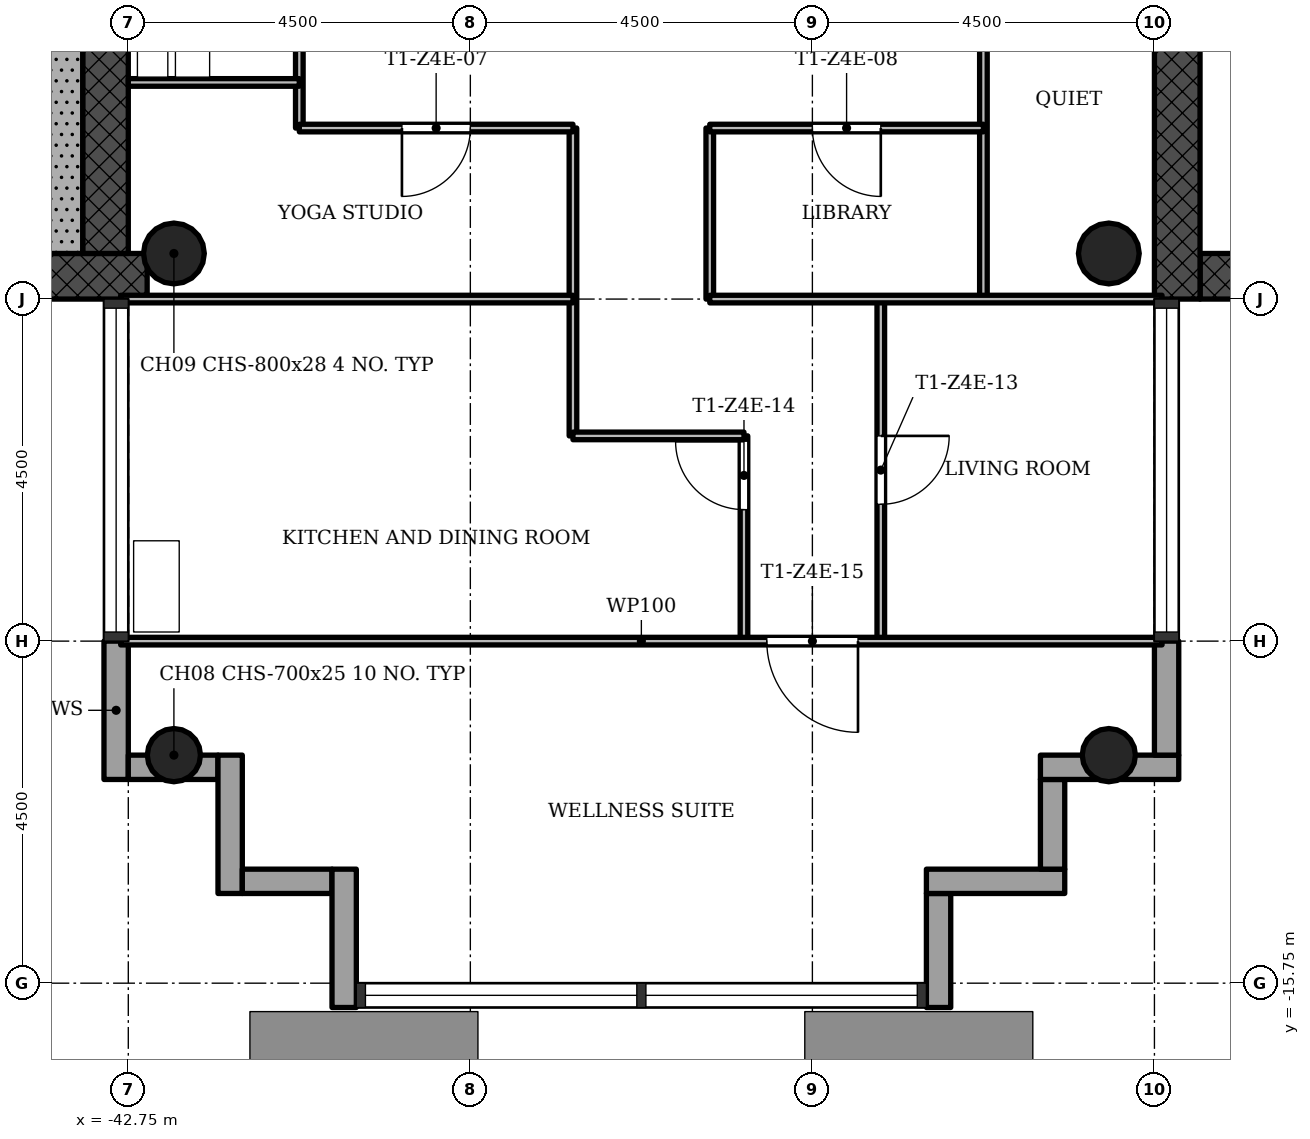
"""IFC4 building model, lengths in metres.
Left out: names, types, materials, properties, quantities, classifications, styles, units other than length and angle.
Written with IfcOpenShell. Run it as: python <this file> out.ifc"""

import sys

from ifc_helpers import new_model, si_unit, direction, frame, frame_2d, origin, origin_2d, place, context, subcontext, project, spatial, rectangle, hollow_circle, extrude, element, fill, save


model = new_model("IFC4")
c1 = context("Model", 3, precision=1e-05, world=origin(), true_north=direction((0.0, 1.0)))
c2 = subcontext(c1, "Body", "Model", "MODEL_VIEW")
j1 = project(units=[si_unit("LENGTHUNIT", "METRE"), si_unit("PLANEANGLEUNIT", "RADIAN")], contexts=[c1])
p1 = place(None, origin())
s1 = spatial("IfcSite", under=j1, at=p1, CompositionType="ELEMENT")
p2 = place(p1, origin())
s2 = spatial("IfcBuilding", under=s1, at=p2, CompositionType="ELEMENT")
p3 = place(p2, frame((0.0, 0.0, 209.6)))
s3 = spatial("IfcBuildingStorey", under=s2, at=p3, CompositionType="ELEMENT", Elevation=209.6)
p4 = place(p3, frame((-28.65, -6.45, 0.0), z_axis=(0.0, 0.0, 1.0), x_axis=(1.0, 0.0, 0.0)))
e1 = element("IfcWall", 1, at=p4, inside=s3, PredefinedType="SHEAR", context=c2, shape_type="SweptSolid", body=[
    extrude(rectangle(XDim=8.4, YDim=0.6, at=frame_2d((4.2, 0.0))), origin(), (0.0, 0.0, 1.0), 3.4),
])
p5 = place(p3, frame((-28.95, 6.15, 0.0), z_axis=(0.0, 0.0, 1.0), x_axis=(0.0, -1.0, 0.0)))
e2 = element("IfcWall", 2, at=p5, inside=s3, PredefinedType="SHEAR", context=c2, shape_type="SweptSolid", body=[
    extrude(rectangle(XDim=12.9, YDim=0.6, at=frame_2d((6.45, 0.0))), origin(), (0.0, 0.0, 1.0), 3.4),
])
p6 = place(p5, frame((5.25, 0.0, 0.0)))
e3 = element("IfcOpeningElement", 3, at=p6, cuts=e2, PredefinedType="OPENING", context=c2, shape_type="SweptSolid", body=[
    extrude(rectangle(XDim=1.8, YDim=2.1, at=frame_2d((0.9, 1.05))), frame((0.0, 0.31, 0.0), z_axis=(0.0, -1.0, 0.0), x_axis=(1.0, 0.0, 0.0)), (0.0, 0.0, 1.0), 0.62),
])
p7 = place(p3, frame((-51.15, -6.45, 0.0), z_axis=(0.0, 0.0, 1.0), x_axis=(1.0, 0.0, 0.0)))
e4 = element("IfcWall", 4, at=p7, inside=s3, PredefinedType="SHEAR", context=c2, shape_type="SweptSolid", body=[
    extrude(rectangle(XDim=8.648, YDim=0.6, at=frame_2d((4.324, 0.0))), origin(), (0.0, 0.0, 1.0), 3.4),
])
p8 = place(p3, frame((-43.05, -6.15, 0.0), z_axis=(0.0, 0.0, 1.0), x_axis=(0.0, 1.0, 0.0)))
e5 = element("IfcWall", 5, at=p8, inside=s3, PredefinedType="SHEAR", context=c2, shape_type="SweptSolid", body=[
    extrude(rectangle(XDim=12.9, YDim=0.6, at=frame_2d((6.45, 0.0))), origin(), (0.0, 0.0, 1.0), 3.4),
])
p9 = place(p8, frame((5.25, 0.0, 0.0)))
e6 = element("IfcOpeningElement", 6, at=p9, cuts=e5, PredefinedType="OPENING", context=c2, shape_type="SweptSolid", body=[
    extrude(rectangle(XDim=1.8, YDim=2.1, at=frame_2d((0.9, 1.05))), frame((0.0, 0.31, 0.0), z_axis=(0.0, -1.0, 0.0), x_axis=(1.0, 0.0, 0.0)), (0.0, 0.0, 1.0), 0.62),
])
for number, where, z_axis, x_axis in (
    (7, (-42.15, -12.75, 0.0), (0.0, 0.0, 1.0), (1.0, 0.0, 0.0)),
    (8, (-29.85, -12.75, 0.0), (0.0, 0.0, 1.0), (1.0, 0.0, 0.0)),
):
    element("IfcColumn", number, at=place(p3, frame(where, z_axis=z_axis, x_axis=x_axis)), inside=s3, PredefinedType="COLUMN", context=c2, shape_type="SweptSolid", body=[
        extrude(hollow_circle(Radius=0.35, WallThickness=0.025, at=origin_2d()), origin(), (0.0, 0.0, 1.0), 3.4),
    ])
for number, where, z_axis, x_axis in (
    (9, (-42.15, -6.15, 0.0), (0.0, 0.0, 1.0), (1.0, 0.0, 0.0)),
    (10, (-29.85, -6.15, 0.0), (0.0, 0.0, 1.0), (1.0, 0.0, 0.0)),
):
    element("IfcColumn", number, at=place(p3, frame(where, z_axis=z_axis, x_axis=x_axis)), inside=s3, PredefinedType="COLUMN", context=c2, shape_type="SweptSolid", body=[
        extrude(hollow_circle(Radius=0.4, WallThickness=0.028, at=origin_2d()), origin(), (0.0, 0.0, 1.0), 3.4),
    ])
p10 = place(p3, frame((-42.91, -11.25, -0.3), z_axis=(0.0, 0.0, 1.0), x_axis=(0.0, -1.0, 0.0)))
e11 = element("IfcWall", 11, at=p10, inside=s3, PredefinedType="STANDARD", context=c2, shape_type="SweptSolid", body=[
    extrude(rectangle(XDim=1.82, YDim=0.32, at=frame_2d((0.91, 0.0))), origin(), (0.0, 0.0, 1.0), 3.4),
])
p11 = place(p3, frame((-42.75, -12.91, -0.3), z_axis=(0.0, 0.0, 1.0), x_axis=(1.0, 0.0, 0.0)))
e12 = element("IfcWall", 12, at=p11, inside=s3, PredefinedType="STANDARD", context=c2, shape_type="SweptSolid", body=[
    extrude(rectangle(XDim=1.18, YDim=0.32, at=frame_2d((0.59, 0.0))), origin(), (0.0, 0.0, 1.0), 3.4),
])
p12 = place(p3, frame((-41.41, -12.75, -0.3), z_axis=(0.0, 0.0, 1.0), x_axis=(0.0, -1.0, 0.0)))
e13 = element("IfcWall", 13, at=p12, inside=s3, PredefinedType="STANDARD", context=c2, shape_type="SweptSolid", body=[
    extrude(rectangle(XDim=1.82, YDim=0.32, at=frame_2d((0.91, 0.0))), origin(), (0.0, 0.0, 1.0), 3.4),
])
p13 = place(p3, frame((-41.25, -14.41, -0.3), z_axis=(0.0, 0.0, 1.0), x_axis=(1.0, 0.0, 0.0)))
e14 = element("IfcWall", 14, at=p13, inside=s3, PredefinedType="STANDARD", context=c2, shape_type="SweptSolid", body=[
    extrude(rectangle(XDim=1.18, YDim=0.32, at=frame_2d((0.59, 0.0))), origin(), (0.0, 0.0, 1.0), 3.4),
])
p14 = place(p3, frame((-39.91, -14.25, -0.3), z_axis=(0.0, 0.0, 1.0), x_axis=(0.0, -1.0, 0.0)))
e15 = element("IfcWall", 15, at=p14, inside=s3, PredefinedType="STANDARD", context=c2, shape_type="SweptSolid", body=[
    extrude(rectangle(XDim=1.82, YDim=0.32, at=frame_2d((0.91, 0.0))), origin(), (0.0, 0.0, 1.0), 3.4),
])
p15 = place(p3, frame((-32.09, -16.07, -0.3), z_axis=(0.0, 0.0, 1.0), x_axis=(0.0, 1.0, 0.0)))
e16 = element("IfcWall", 16, at=p15, inside=s3, PredefinedType="STANDARD", context=c2, shape_type="SweptSolid", body=[
    extrude(rectangle(XDim=1.5, YDim=0.32, at=frame_2d((0.75, 0.0))), origin(), (0.0, 0.0, 1.0), 3.4),
])
p16 = place(p3, frame((-32.25, -14.41, -0.3), z_axis=(0.0, 0.0, 1.0), x_axis=(1.0, 0.0, 0.0)))
e17 = element("IfcWall", 17, at=p16, inside=s3, PredefinedType="STANDARD", context=c2, shape_type="SweptSolid", body=[
    extrude(rectangle(XDim=1.82, YDim=0.32, at=frame_2d((0.91, 0.0))), origin(), (0.0, 0.0, 1.0), 3.4),
])
p17 = place(p3, frame((-30.59, -14.25, -0.3), z_axis=(0.0, 0.0, 1.0), x_axis=(0.0, 1.0, 0.0)))
e18 = element("IfcWall", 18, at=p17, inside=s3, PredefinedType="STANDARD", context=c2, shape_type="SweptSolid", body=[
    extrude(rectangle(XDim=1.18, YDim=0.32, at=frame_2d((0.59, 0.0))), origin(), (0.0, 0.0, 1.0), 3.4),
])
p18 = place(p3, frame((-30.75, -12.91, -0.3), z_axis=(0.0, 0.0, 1.0), x_axis=(1.0, 0.0, 0.0)))
e19 = element("IfcWall", 19, at=p18, inside=s3, PredefinedType="STANDARD", context=c2, shape_type="SweptSolid", body=[
    extrude(rectangle(XDim=1.82, YDim=0.32, at=frame_2d((0.91, 0.0))), origin(), (0.0, 0.0, 1.0), 3.4),
])
p19 = place(p3, frame((-29.09, -12.75, -0.3), z_axis=(0.0, 0.0, 1.0), x_axis=(0.0, 1.0, 0.0)))
e20 = element("IfcWall", 20, at=p19, inside=s3, PredefinedType="STANDARD", context=c2, shape_type="SweptSolid", body=[
    extrude(rectangle(XDim=1.5, YDim=0.32, at=frame_2d((0.75, 0.0))), origin(), (0.0, 0.0, 1.0), 3.4),
])
p20 = place(p3, frame((-40.5, -4.5, 0.0), z_axis=(0.0, 0.0, 1.0), x_axis=(0.0, 1.0, 0.0)))
e21 = element("IfcWall", 21, at=p20, inside=s3, PredefinedType="PARTITIONING", context=c2, shape_type="SweptSolid", body=[
    extrude(rectangle(XDim=3.0, YDim=0.1, at=frame_2d((1.5, 0.0))), origin(), (0.0, 0.0, 1.0), 3.0),
])
p21 = place(p3, frame((-36.9, -8.55, 0.0), z_axis=(0.0, 0.0, 1.0), x_axis=(0.0, 1.0, 0.0)))
e22 = element("IfcWall", 22, at=p21, inside=s3, PredefinedType="PARTITIONING", context=c2, shape_type="SweptSolid", body=[
    extrude(rectangle(XDim=4.05, YDim=0.1, at=frame_2d((2.025, 0.0))), origin(), (0.0, 0.0, 1.0), 3.0),
])
p22 = place(p3, frame((-35.1, -6.75, 0.0), z_axis=(0.0, 0.0, 1.0), x_axis=(0.0, 1.0, 0.0)))
e23 = element("IfcWall", 23, at=p22, inside=s3, PredefinedType="PARTITIONING", context=c2, shape_type="SweptSolid", body=[
    extrude(rectangle(XDim=2.25, YDim=0.1, at=frame_2d((1.125, 0.0))), origin(), (0.0, 0.0, 1.0), 3.0),
])
p23 = place(p3, frame((-34.65, -11.25, 0.0), z_axis=(0.0, 0.0, 1.0), x_axis=(0.0, 1.0, 0.0)))
e24 = element("IfcWall", 24, at=p23, inside=s3, PredefinedType="PARTITIONING", context=c2, shape_type="SweptSolid", body=[
    extrude(rectangle(XDim=2.7, YDim=0.1, at=frame_2d((1.35, 0.0))), origin(), (0.0, 0.0, 1.0), 3.0),
])
p24 = place(p23, frame((1.73, 0.0, 0.0)))
e25 = element("IfcOpeningElement", 25, at=p24, cuts=e24, PredefinedType="OPENING", context=c2, shape_type="SweptSolid", body=[
    extrude(rectangle(XDim=0.9, YDim=2.1, at=frame_2d((0.45, 1.05))), frame((0.0, 0.06, 0.0), z_axis=(0.0, -1.0, 0.0), x_axis=(1.0, 0.0, 0.0)), (0.0, 0.0, 1.0), 0.12),
])
p25 = place(p3, frame((-32.85, -11.25, 0.0), z_axis=(0.0, 0.0, 1.0), x_axis=(0.0, 1.0, 0.0)))
e26 = element("IfcWall", 26, at=p25, inside=s3, PredefinedType="PARTITIONING", context=c2, shape_type="SweptSolid", body=[
    extrude(rectangle(XDim=4.5, YDim=0.1, at=frame_2d((2.25, 0.0))), origin(), (0.0, 0.0, 1.0), 3.0),
])
p26 = place(p25, frame((1.8, 0.0, 0.0)))
e27 = element("IfcOpeningElement", 27, at=p26, cuts=e26, PredefinedType="OPENING", context=c2, shape_type="SweptSolid", body=[
    extrude(rectangle(XDim=0.9, YDim=2.1, at=frame_2d((0.45, 1.05))), frame((0.0, 0.06, 0.0), z_axis=(0.0, -1.0, 0.0), x_axis=(1.0, 0.0, 0.0)), (0.0, 0.0, 1.0), 0.12),
])
p27 = place(p3, frame((-31.5, -6.75, 0.0), z_axis=(0.0, 0.0, 1.0), x_axis=(0.0, 1.0, 0.0)))
e28 = element("IfcWall", 28, at=p27, inside=s3, PredefinedType="PARTITIONING", context=c2, shape_type="SweptSolid", body=[
    extrude(rectangle(XDim=5.25, YDim=0.1, at=frame_2d((2.625, 0.0))), origin(), (0.0, 0.0, 1.0), 3.0),
])
p28 = place(p27, frame((3.3, 0.0, 0.0)))
e29 = element("IfcOpeningElement", 29, at=p28, cuts=e28, PredefinedType="OPENING", context=c2, shape_type="SweptSolid", body=[
    extrude(rectangle(XDim=0.9, YDim=2.1, at=frame_2d((0.45, 1.05))), frame((0.0, 0.06, 0.0), z_axis=(0.0, -1.0, 0.0), x_axis=(1.0, 0.0, 0.0)), (0.0, 0.0, 1.0), 0.12),
])
p29 = place(p3, frame((-42.85, -11.25, 0.0), z_axis=(0.0, 0.0, 1.0), x_axis=(1.0, 0.0, 0.0)))
e30 = element("IfcWall", 30, at=p29, inside=s3, PredefinedType="PARTITIONING", context=c2, shape_type="SweptSolid", body=[
    extrude(rectangle(XDim=13.7, YDim=0.1, at=frame_2d((6.85, 0.0))), origin(), (0.0, 0.0, 1.0), 3.0),
])
p30 = place(p29, frame((8.5, 0.0, 0.0)))
e31 = element("IfcOpeningElement", 31, at=p30, cuts=e30, PredefinedType="OPENING", context=c2, shape_type="SweptSolid", body=[
    extrude(rectangle(XDim=1.2, YDim=2.1, at=frame_2d((0.6, 1.05))), frame((0.0, 0.06, 0.0), z_axis=(0.0, -1.0, 0.0), x_axis=(1.0, 0.0, 0.0)), (0.0, 0.0, 1.0), 0.12),
])
p31 = place(p3, frame((-36.9, -8.55, 0.0), z_axis=(0.0, 0.0, 1.0), x_axis=(1.0, 0.0, 0.0)))
e32 = element("IfcWall", 32, at=p31, inside=s3, PredefinedType="PARTITIONING", context=c2, shape_type="SweptSolid", body=[
    extrude(rectangle(XDim=2.25, YDim=0.1, at=frame_2d((1.125, 0.0))), origin(), (0.0, 0.0, 1.0), 3.0),
])
for number, where, z_axis, x_axis in (
    (33, (-42.85, -6.75, 0.0), (0.0, 0.0, 1.0), (1.0, 0.0, 0.0)),
    (34, (-35.1, -6.75, 0.0), (0.0, 0.0, 1.0), (1.0, 0.0, 0.0)),
):
    element("IfcWall", number, at=place(p3, frame(where, z_axis=z_axis, x_axis=x_axis)), inside=s3, PredefinedType="PARTITIONING", context=c2, shape_type="SweptSolid", body=[
        extrude(rectangle(XDim=5.95, YDim=0.1, at=frame_2d((2.975, 0.0))), origin(), (0.0, 0.0, 1.0), 3.0),
    ])
p32 = place(p3, frame((-40.5, -4.5, 0.0), z_axis=(0.0, 0.0, 1.0), x_axis=(1.0, 0.0, 0.0)))
e35 = element("IfcWall", 35, at=p32, inside=s3, PredefinedType="PARTITIONING", context=c2, shape_type="SweptSolid", body=[
    extrude(rectangle(XDim=3.6, YDim=0.1, at=frame_2d((1.8, 0.0))), origin(), (0.0, 0.0, 1.0), 3.0),
])
p33 = place(p32, frame((1.35, 0.0, 0.0)))
e36 = element("IfcOpeningElement", 36, at=p33, cuts=e35, PredefinedType="OPENING", context=c2, shape_type="SweptSolid", body=[
    extrude(rectangle(XDim=0.9, YDim=2.1, at=frame_2d((0.45, 1.05))), frame((0.0, 0.06, 0.0), z_axis=(0.0, -1.0, 0.0), x_axis=(1.0, 0.0, 0.0)), (0.0, 0.0, 1.0), 0.12),
])
p34 = place(p3, frame((-35.1, -4.5, 0.0), z_axis=(0.0, 0.0, 1.0), x_axis=(1.0, 0.0, 0.0)))
e37 = element("IfcWall", 37, at=p34, inside=s3, PredefinedType="PARTITIONING", context=c2, shape_type="SweptSolid", body=[
    extrude(rectangle(XDim=3.6, YDim=0.1, at=frame_2d((1.8, 0.0))), origin(), (0.0, 0.0, 1.0), 3.0),
])
p35 = place(p34, frame((1.35, 0.0, 0.0)))
e38 = element("IfcOpeningElement", 38, at=p35, cuts=e37, PredefinedType="OPENING", context=c2, shape_type="SweptSolid", body=[
    extrude(rectangle(XDim=0.9, YDim=2.1, at=frame_2d((0.45, 1.05))), frame((0.0, 0.06, 0.0), z_axis=(0.0, -1.0, 0.0), x_axis=(1.0, 0.0, 0.0)), (0.0, 0.0, 1.0), 0.12),
])
p36 = place(p3, frame((-42.75, -3.9, 0.0), z_axis=(0.0, 0.0, 1.0), x_axis=(1.0, 0.0, 0.0)))
e39 = element("IfcWall", 39, at=p36, inside=s3, PredefinedType="PARTITIONING", context=c2, shape_type="SweptSolid", body=[
    extrude(rectangle(XDim=2.25, YDim=0.1, at=frame_2d((1.125, 0.0))), origin(), (0.0, 0.0, 1.0), 3.0),
])
p37 = place(p3, frame((-43.65, -1.85, 0.0), z_axis=(0.0, 0.0, 1.0), x_axis=(0.0, -1.0, 0.0)))
e40 = element("IfcWall", 40, at=p37, inside=s3, PredefinedType="SHEAR", context=c2, shape_type="SweptSolid", body=[
    extrude(rectangle(XDim=4.3, YDim=0.6, at=frame_2d((2.15, 0.0))), origin(), (0.0, 0.0, 1.0), 3.4),
])
p38 = place(p33, origin())
e41 = element("IfcDoor", 41, at=p38, inside=s3, OperationType="SINGLE_SWING_LEFT", PredefinedType="DOOR", context=c2, shape_type="SweptSolid", body=[
    extrude(rectangle(XDim=0.9, YDim=2.1, at=frame_2d((0.45, 1.05))), frame((0.0, 0.025, 0.0), z_axis=(0.0, -1.0, 0.0), x_axis=(1.0, 0.0, 0.0)), (0.0, 0.0, 1.0), 0.05),
])
fill(e36, e41)
p39 = place(p35, origin())
e42 = element("IfcDoor", 42, at=p39, inside=s3, OperationType="SINGLE_SWING_RIGHT", PredefinedType="DOOR", context=c2, shape_type="SweptSolid", body=[
    extrude(rectangle(XDim=0.9, YDim=2.1, at=frame_2d((0.45, 1.05))), frame((0.0, 0.025, 0.0), z_axis=(0.0, -1.0, 0.0), x_axis=(1.0, 0.0, 0.0)), (0.0, 0.0, 1.0), 0.05),
])
fill(e38, e42)
p40 = place(p26, origin())
e43 = element("IfcDoor", 43, at=p40, inside=s3, OperationType="SINGLE_SWING_RIGHT", PredefinedType="DOOR", context=c2, shape_type="SweptSolid", body=[
    extrude(rectangle(XDim=0.9, YDim=2.1, at=frame_2d((0.45, 1.05))), frame((0.0, 0.025, 0.0), z_axis=(0.0, -1.0, 0.0), x_axis=(1.0, 0.0, 0.0)), (0.0, 0.0, 1.0), 0.05),
])
fill(e27, e43)
p41 = place(p24, origin())
e44 = element("IfcDoor", 44, at=p41, inside=s3, OperationType="SINGLE_SWING_LEFT", PredefinedType="DOOR", context=c2, shape_type="SweptSolid", body=[
    extrude(rectangle(XDim=0.9, YDim=2.1, at=frame_2d((0.45, 1.05))), frame((0.0, 0.025, 0.0), z_axis=(0.0, -1.0, 0.0), x_axis=(1.0, 0.0, 0.0)), (0.0, 0.0, 1.0), 0.05),
])
fill(e25, e44)
p42 = place(p30, origin())
e45 = element("IfcDoor", 45, at=p42, inside=s3, OperationType="SINGLE_SWING_RIGHT", PredefinedType="DOOR", context=c2, shape_type="SweptSolid", body=[
    extrude(rectangle(XDim=1.2, YDim=2.1, at=frame_2d((0.6, 1.05))), frame((0.0, 0.025, 0.0), z_axis=(0.0, -1.0, 0.0), x_axis=(1.0, 0.0, 0.0)), (0.0, 0.0, 1.0), 0.05),
])
fill(e31, e45)
save(model, sys.argv[1])
